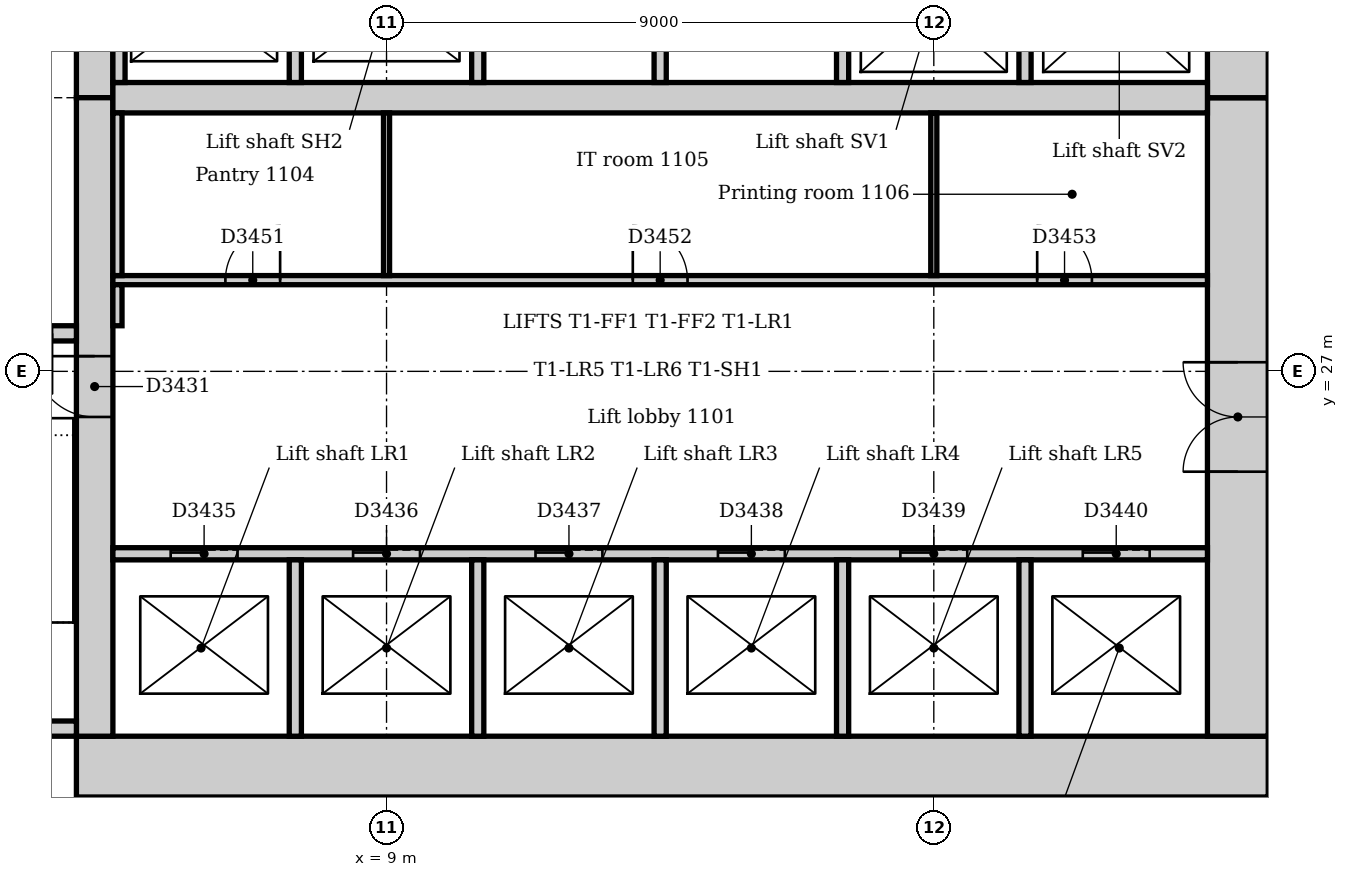
"""IFC4 building model, lengths in metres.
Left out: names, types, materials, properties, quantities, classifications, styles, units other than length and angle.
Written with IfcOpenShell. Run it as: python <this file> out.ifc"""

import sys

from ifc_helpers import new_model, si_unit, direction, frame, frame_2d, origin, place, context, subcontext, project, spatial, rectangle, extrude, element, fill, save


model = new_model("IFC4")
c1 = context("Model", 3, precision=1e-05, world=origin(), true_north=direction((0.0, 1.0)))
c2 = subcontext(c1, "Body", "Model", "MODEL_VIEW")
j1 = project(units=[si_unit("LENGTHUNIT", "METRE"), si_unit("PLANEANGLEUNIT", "RADIAN")], contexts=[c1])
p1 = place(None, origin())
s1 = spatial("IfcSite", under=j1, at=p1, CompositionType="ELEMENT")
p2 = place(p1, origin())
s2 = spatial("IfcBuilding", under=s1, at=p2, CompositionType="ELEMENT")
p3 = place(p2, frame((0.0, 0.0, 51.0)))
s3 = spatial("IfcBuildingStorey", under=s2, at=p3, CompositionType="ELEMENT", Elevation=51.0)
p4 = place(p3, frame((3.9, 20.5, 0.0), z_axis=(0.0, 0.0, 1.0), x_axis=(1.0, 0.0, 0.0)))
e1 = element("IfcWall", 1, at=p4, inside=s3, PredefinedType="SOLIDWALL", context=c2, shape_type="SweptSolid", body=[
    extrude(rectangle(XDim=19.6, YDim=1.0, at=frame_2d((9.8, 0.0))), origin(), (0.0, 0.0, 1.0), 4.0),
])
p5 = place(p3, frame((23.0, 21.0, 0.0), z_axis=(0.0, 0.0, 1.0), x_axis=(0.0, 1.0, 0.0)))
e2 = element("IfcWall", 2, at=p5, inside=s3, PredefinedType="SOLIDWALL", context=c2, shape_type="SweptSolid", body=[
    extrude(rectangle(XDim=10.5, YDim=1.0, at=frame_2d((5.25, 0.0))), origin(), (0.0, 0.0, 1.0), 4.0),
])
p6 = place(p5, frame((4.35, 0.0, 0.0)))
e3 = element("IfcOpeningElement", 3, at=p6, cuts=e2, PredefinedType="OPENING", context=c2, shape_type="SweptSolid", body=[
    extrude(rectangle(XDim=1.8, YDim=2.1, at=frame_2d((0.9, 1.05))), frame((0.0, 0.51, 0.0), z_axis=(0.0, -1.0, 0.0), x_axis=(1.0, 0.0, 0.0)), (0.0, 0.0, 1.0), 1.02),
])
p7 = place(p3, frame((23.0, 31.5, 0.0), z_axis=(0.0, 0.0, 1.0), x_axis=(0.0, 1.0, 0.0)))
e4 = element("IfcWall", 4, at=p7, inside=s3, PredefinedType="SOLIDWALL", context=c2, shape_type="SweptSolid", body=[
    extrude(rectangle(XDim=10.5, YDim=1.0, at=frame_2d((5.25, 0.0))), origin(), (0.0, 0.0, 1.0), 4.0),
])
p8 = place(p7, frame((3.15, 0.0, 0.0)))
e5 = element("IfcOpeningElement", 5, at=p8, cuts=e4, PredefinedType="OPENING", context=c2, shape_type="SweptSolid", body=[
    extrude(rectangle(XDim=1.0, YDim=2.1, at=frame_2d((0.5, 1.05))), frame((0.0, 0.51, 0.0), z_axis=(0.0, -1.0, 0.0), x_axis=(1.0, 0.0, 0.0)), (0.0, 0.0, 1.0), 1.02),
])
p9 = place(p7, frame((5.2, 0.0, 0.0)))
e6 = element("IfcOpeningElement", 6, at=p9, cuts=e4, PredefinedType="OPENING", context=c2, shape_type="SweptSolid", body=[
    extrude(rectangle(XDim=1.0, YDim=2.1, at=frame_2d((0.5, 1.05))), frame((0.0, 0.51, 0.0), z_axis=(0.0, -1.0, 0.0), x_axis=(1.0, 0.0, 0.0)), (0.0, 0.0, 1.0), 1.02),
])
p10 = place(p3, frame((4.2, 42.0, 0.0), z_axis=(0.0, 0.0, 1.0), x_axis=(0.0, -1.0, 0.0)))
e7 = element("IfcWall", 7, at=p10, inside=s3, PredefinedType="SOLIDWALL", context=c2, shape_type="SweptSolid", body=[
    extrude(rectangle(XDim=10.5, YDim=0.6, at=frame_2d((5.25, 0.0))), origin(), (0.0, 0.0, 1.0), 4.0),
])
p11 = place(p10, frame((5.3, 0.0, 0.0)))
e8 = element("IfcOpeningElement", 8, at=p11, cuts=e7, PredefinedType="OPENING", context=c2, shape_type="SweptSolid", body=[
    extrude(rectangle(XDim=1.0, YDim=2.1, at=frame_2d((0.5, 1.05))), frame((0.0, 0.31, 0.0), z_axis=(0.0, -1.0, 0.0), x_axis=(1.0, 0.0, 0.0)), (0.0, 0.0, 1.0), 0.62),
])
p12 = place(p3, frame((4.2, 31.5, 0.0), z_axis=(0.0, 0.0, 1.0), x_axis=(0.0, -1.0, 0.0)))
e9 = element("IfcWall", 9, at=p12, inside=s3, PredefinedType="SOLIDWALL", context=c2, shape_type="SweptSolid", body=[
    extrude(rectangle(XDim=10.5, YDim=0.6, at=frame_2d((5.25, 0.0))), origin(), (0.0, 0.0, 1.0), 4.0),
])
p13 = place(p12, frame((4.25, 0.0, 0.0)))
e10 = element("IfcOpeningElement", 10, at=p13, cuts=e9, PredefinedType="OPENING", context=c2, shape_type="SweptSolid", body=[
    extrude(rectangle(XDim=1.0, YDim=2.1, at=frame_2d((0.5, 1.05))), frame((0.0, 0.31, 0.0), z_axis=(0.0, -1.0, 0.0), x_axis=(1.0, 0.0, 0.0)), (0.0, 0.0, 1.0), 0.62),
])
p14 = place(p3, frame((4.5, 31.5, 0.0), z_axis=(0.0, 0.0, 1.0), x_axis=(1.0, 0.0, 0.0)))
e11 = element("IfcWall", 11, at=p14, inside=s3, PredefinedType="SOLIDWALL", context=c2, shape_type="SweptSolid", body=[
    extrude(rectangle(XDim=18.0, YDim=0.5, at=frame_2d((9.0, 0.0))), origin(), (0.0, 0.0, 1.0), 4.0),
])
p15 = place(p3, frame((0.36, 21.125, 0.0), z_axis=(0.0, 0.0, 1.0), x_axis=(1.0, 0.0, 0.0)))
e12 = element("IfcWall", 12, at=p15, inside=s3, PredefinedType="SOLIDWALL", context=c2, shape_type="SweptSolid", body=[
    extrude(rectangle(XDim=3.54, YDim=0.25, at=frame_2d((1.77, 0.0))), origin(), (0.0, 0.0, 1.0), 4.0),
])
p16 = place(p3, frame((3.9, 27.625, 0.0), z_axis=(0.0, 0.0, 1.0), x_axis=(-1.0, 0.0, 0.0)))
e13 = element("IfcWall", 13, at=p16, inside=s3, PredefinedType="SOLIDWALL", context=c2, shape_type="SweptSolid", body=[
    extrude(rectangle(XDim=3.54, YDim=0.25, at=frame_2d((1.77, 0.0))), origin(), (0.0, 0.0, 1.0), 4.0),
])
p17 = place(p16, frame((0.4, 0.0, 0.0)))
e14 = element("IfcOpeningElement", 14, at=p17, cuts=e13, PredefinedType="OPENING", context=c2, shape_type="SweptSolid", body=[
    extrude(rectangle(XDim=1.0, YDim=2.1, at=frame_2d((0.5, 1.05))), frame((0.0, 0.135, 0.0), z_axis=(0.0, -1.0, 0.0), x_axis=(1.0, 0.0, 0.0)), (0.0, 0.0, 1.0), 0.27),
])
p18 = place(p3, frame((4.5, 24.0, 0.0), z_axis=(0.0, 0.0, 1.0), x_axis=(1.0, 0.0, 0.0)))
e15 = element("IfcWall", 15, at=p18, inside=s3, PredefinedType="PARTITIONING", context=c2, shape_type="SweptSolid", body=[
    extrude(rectangle(XDim=18.0, YDim=0.2, at=frame_2d((9.0, 0.0))), origin(), (0.0, 0.0, 1.0), 3.85),
])
p19 = place(p18, frame((0.95, 0.0, 0.0)))
e16 = element("IfcOpeningElement", 16, at=p19, cuts=e15, PredefinedType="OPENING", context=c2, shape_type="SweptSolid", body=[
    extrude(rectangle(XDim=1.1, YDim=2.1, at=frame_2d((0.55, 1.05))), frame((0.0, 0.11, 0.0), z_axis=(0.0, -1.0, 0.0), x_axis=(1.0, 0.0, 0.0)), (0.0, 0.0, 1.0), 0.22),
])
p20 = place(p18, frame((3.95, 0.0, 0.0)))
e17 = element("IfcOpeningElement", 17, at=p20, cuts=e15, PredefinedType="OPENING", context=c2, shape_type="SweptSolid", body=[
    extrude(rectangle(XDim=1.1, YDim=2.1, at=frame_2d((0.55, 1.05))), frame((0.0, 0.11, 0.0), z_axis=(0.0, -1.0, 0.0), x_axis=(1.0, 0.0, 0.0)), (0.0, 0.0, 1.0), 0.22),
])
p21 = place(p18, frame((6.95, 0.0, 0.0)))
e18 = element("IfcOpeningElement", 18, at=p21, cuts=e15, PredefinedType="OPENING", context=c2, shape_type="SweptSolid", body=[
    extrude(rectangle(XDim=1.1, YDim=2.1, at=frame_2d((0.55, 1.05))), frame((0.0, 0.11, 0.0), z_axis=(0.0, -1.0, 0.0), x_axis=(1.0, 0.0, 0.0)), (0.0, 0.0, 1.0), 0.22),
])
p22 = place(p18, frame((9.95, 0.0, 0.0)))
e19 = element("IfcOpeningElement", 19, at=p22, cuts=e15, PredefinedType="OPENING", context=c2, shape_type="SweptSolid", body=[
    extrude(rectangle(XDim=1.1, YDim=2.1, at=frame_2d((0.55, 1.05))), frame((0.0, 0.11, 0.0), z_axis=(0.0, -1.0, 0.0), x_axis=(1.0, 0.0, 0.0)), (0.0, 0.0, 1.0), 0.22),
])
p23 = place(p18, frame((12.95, 0.0, 0.0)))
e20 = element("IfcOpeningElement", 20, at=p23, cuts=e15, PredefinedType="OPENING", context=c2, shape_type="SweptSolid", body=[
    extrude(rectangle(XDim=1.1, YDim=2.1, at=frame_2d((0.55, 1.05))), frame((0.0, 0.11, 0.0), z_axis=(0.0, -1.0, 0.0), x_axis=(1.0, 0.0, 0.0)), (0.0, 0.0, 1.0), 0.22),
])
p24 = place(p18, frame((15.95, 0.0, 0.0)))
e21 = element("IfcOpeningElement", 21, at=p24, cuts=e15, PredefinedType="OPENING", context=c2, shape_type="SweptSolid", body=[
    extrude(rectangle(XDim=1.1, YDim=2.1, at=frame_2d((0.55, 1.05))), frame((0.0, 0.11, 0.0), z_axis=(0.0, -1.0, 0.0), x_axis=(1.0, 0.0, 0.0)), (0.0, 0.0, 1.0), 0.22),
])
p25 = place(p3, frame((4.6, 31.75, 0.0), z_axis=(0.0, 0.0, 1.0), x_axis=(0.0, 1.0, 0.0)))
e22 = element("IfcWall", 22, at=p25, inside=s3, PredefinedType="PARTITIONING", context=c2, shape_type="SweptSolid", body=[
    extrude(rectangle(XDim=2.65, YDim=0.2, at=frame_2d((1.325, 0.0))), origin(), (0.0, 0.0, 1.0), 3.85),
])
p26 = place(p3, frame((7.5, 21.0, 0.0), z_axis=(0.0, 0.0, 1.0), x_axis=(0.0, 1.0, 0.0)))
e23 = element("IfcWall", 23, at=p26, inside=s3, PredefinedType="PARTITIONING", context=c2, shape_type="SweptSolid", body=[
    extrude(rectangle(XDim=2.9, YDim=0.2, at=frame_2d((1.45, 0.0))), origin(), (0.0, 0.0, 1.0), 3.85),
])
p27 = place(p3, frame((7.5, 31.75, 0.0), z_axis=(0.0, 0.0, 1.0), x_axis=(0.0, 1.0, 0.0)))
e24 = element("IfcWall", 24, at=p27, inside=s3, PredefinedType="PARTITIONING", context=c2, shape_type="SweptSolid", body=[
    extrude(rectangle(XDim=2.65, YDim=0.2, at=frame_2d((1.325, 0.0))), origin(), (0.0, 0.0, 1.0), 3.85),
])
p28 = place(p3, frame((10.5, 21.0, 0.0), z_axis=(0.0, 0.0, 1.0), x_axis=(0.0, 1.0, 0.0)))
e25 = element("IfcWall", 25, at=p28, inside=s3, PredefinedType="PARTITIONING", context=c2, shape_type="SweptSolid", body=[
    extrude(rectangle(XDim=2.9, YDim=0.2, at=frame_2d((1.45, 0.0))), origin(), (0.0, 0.0, 1.0), 3.85),
])
p29 = place(p3, frame((10.5, 31.75, 0.0), z_axis=(0.0, 0.0, 1.0), x_axis=(0.0, 1.0, 0.0)))
e26 = element("IfcWall", 26, at=p29, inside=s3, PredefinedType="PARTITIONING", context=c2, shape_type="SweptSolid", body=[
    extrude(rectangle(XDim=2.65, YDim=0.2, at=frame_2d((1.325, 0.0))), origin(), (0.0, 0.0, 1.0), 3.85),
])
p30 = place(p3, frame((13.5, 21.0, 0.0), z_axis=(0.0, 0.0, 1.0), x_axis=(0.0, 1.0, 0.0)))
e27 = element("IfcWall", 27, at=p30, inside=s3, PredefinedType="PARTITIONING", context=c2, shape_type="SweptSolid", body=[
    extrude(rectangle(XDim=2.9, YDim=0.2, at=frame_2d((1.45, 0.0))), origin(), (0.0, 0.0, 1.0), 3.85),
])
p31 = place(p3, frame((13.5, 31.75, 0.0), z_axis=(0.0, 0.0, 1.0), x_axis=(0.0, 1.0, 0.0)))
e28 = element("IfcWall", 28, at=p31, inside=s3, PredefinedType="PARTITIONING", context=c2, shape_type="SweptSolid", body=[
    extrude(rectangle(XDim=2.65, YDim=0.2, at=frame_2d((1.325, 0.0))), origin(), (0.0, 0.0, 1.0), 3.85),
])
p32 = place(p3, frame((16.5, 21.0, 0.0), z_axis=(0.0, 0.0, 1.0), x_axis=(0.0, 1.0, 0.0)))
e29 = element("IfcWall", 29, at=p32, inside=s3, PredefinedType="PARTITIONING", context=c2, shape_type="SweptSolid", body=[
    extrude(rectangle(XDim=2.9, YDim=0.2, at=frame_2d((1.45, 0.0))), origin(), (0.0, 0.0, 1.0), 3.85),
])
p33 = place(p3, frame((16.5, 31.75, 0.0), z_axis=(0.0, 0.0, 1.0), x_axis=(0.0, 1.0, 0.0)))
e30 = element("IfcWall", 30, at=p33, inside=s3, PredefinedType="PARTITIONING", context=c2, shape_type="SweptSolid", body=[
    extrude(rectangle(XDim=2.65, YDim=0.2, at=frame_2d((1.325, 0.0))), origin(), (0.0, 0.0, 1.0), 3.85),
])
p34 = place(p3, frame((19.5, 21.0, 0.0), z_axis=(0.0, 0.0, 1.0), x_axis=(0.0, 1.0, 0.0)))
e31 = element("IfcWall", 31, at=p34, inside=s3, PredefinedType="PARTITIONING", context=c2, shape_type="SweptSolid", body=[
    extrude(rectangle(XDim=2.9, YDim=0.2, at=frame_2d((1.45, 0.0))), origin(), (0.0, 0.0, 1.0), 3.85),
])
p35 = place(p3, frame((19.5, 31.75, 0.0), z_axis=(0.0, 0.0, 1.0), x_axis=(0.0, 1.0, 0.0)))
e32 = element("IfcWall", 32, at=p35, inside=s3, PredefinedType="PARTITIONING", context=c2, shape_type="SweptSolid", body=[
    extrude(rectangle(XDim=2.65, YDim=0.2, at=frame_2d((1.325, 0.0))), origin(), (0.0, 0.0, 1.0), 3.85),
])
p36 = place(p3, frame((4.5, 28.5, 0.0), z_axis=(0.0, 0.0, 1.0), x_axis=(1.0, 0.0, 0.0)))
e33 = element("IfcWall", 33, at=p36, inside=s3, PredefinedType="PARTITIONING", context=c2, shape_type="SweptSolid", body=[
    extrude(rectangle(XDim=18.0, YDim=0.15, at=frame_2d((9.0, 0.0))), origin(), (0.0, 0.0, 1.0), 3.85),
])
p37 = place(p36, frame((1.85, 0.0, 0.0)))
e34 = element("IfcOpeningElement", 34, at=p37, cuts=e33, PredefinedType="OPENING", context=c2, shape_type="SweptSolid", body=[
    extrude(rectangle(XDim=0.9, YDim=2.1, at=frame_2d((0.45, 1.05))), frame((0.0, 0.085, 0.0), z_axis=(0.0, -1.0, 0.0), x_axis=(1.0, 0.0, 0.0)), (0.0, 0.0, 1.0), 0.17),
])
p38 = place(p36, frame((8.55, 0.0, 0.0)))
e35 = element("IfcOpeningElement", 35, at=p38, cuts=e33, PredefinedType="OPENING", context=c2, shape_type="SweptSolid", body=[
    extrude(rectangle(XDim=0.9, YDim=2.1, at=frame_2d((0.45, 1.05))), frame((0.0, 0.085, 0.0), z_axis=(0.0, -1.0, 0.0), x_axis=(1.0, 0.0, 0.0)), (0.0, 0.0, 1.0), 0.17),
])
p39 = place(p36, frame((15.2, 0.0, 0.0)))
e36 = element("IfcOpeningElement", 36, at=p39, cuts=e33, PredefinedType="OPENING", context=c2, shape_type="SweptSolid", body=[
    extrude(rectangle(XDim=0.9, YDim=2.1, at=frame_2d((0.45, 1.05))), frame((0.0, 0.085, 0.0), z_axis=(0.0, -1.0, 0.0), x_axis=(1.0, 0.0, 0.0)), (0.0, 0.0, 1.0), 0.17),
])
p40 = place(p3, frame((4.575, 27.75, 0.0), z_axis=(0.0, 0.0, 1.0), x_axis=(0.0, 1.0, 0.0)))
e37 = element("IfcWall", 37, at=p40, inside=s3, PredefinedType="PARTITIONING", context=c2, shape_type="SweptSolid", body=[
    extrude(rectangle(XDim=0.675, YDim=0.15, at=frame_2d((0.338, 0.0))), origin(), (0.0, 0.0, 1.0), 3.85),
])
p41 = place(p3, frame((4.575, 28.575, 0.0), z_axis=(0.0, 0.0, 1.0), x_axis=(0.0, 1.0, 0.0)))
e38 = element("IfcWall", 38, at=p41, inside=s3, PredefinedType="PARTITIONING", context=c2, shape_type="SweptSolid", body=[
    extrude(rectangle(XDim=2.675, YDim=0.15, at=frame_2d((1.337, 0.0))), origin(), (0.0, 0.0, 1.0), 3.85),
])
for number, where, z_axis, x_axis in (
    (39, (9.0, 28.575, 0.0), (0.0, 0.0, 1.0), (0.0, 1.0, 0.0)),
    (40, (18.0, 28.575, 0.0), (0.0, 0.0, 1.0), (0.0, 1.0, 0.0)),
):
    element("IfcWall", number, at=place(p3, frame(where, z_axis=z_axis, x_axis=x_axis)), inside=s3, PredefinedType="PARTITIONING", context=c2, shape_type="SweptSolid", body=[
        extrude(rectangle(XDim=2.675, YDim=0.1, at=frame_2d((1.337, 0.0))), origin(), (0.0, 0.0, 1.0), 3.85),
    ])
p42 = place(p13, frame((1.0, 0.0, 0.0), z_axis=(0.0, 0.0, 1.0), x_axis=(-1.0, 0.0, 0.0)))
e41 = element("IfcDoor", 41, at=p42, inside=s3, OperationType="SINGLE_SWING_RIGHT", PredefinedType="DOOR", context=c2, shape_type="SweptSolid", body=[
    extrude(rectangle(XDim=1.0, YDim=2.1, at=frame_2d((0.5, 1.05))), frame((0.0, 0.025, 0.0), z_axis=(0.0, -1.0, 0.0), x_axis=(1.0, 0.0, 0.0)), (0.0, 0.0, 1.0), 0.05),
])
fill(e10, e41)
p43 = place(p19, origin())
e42 = element("IfcDoor", 42, at=p43, inside=s3, OperationType="SLIDING_TO_LEFT", PredefinedType="DOOR", context=c2, shape_type="SweptSolid", body=[
    extrude(rectangle(XDim=1.1, YDim=2.1, at=frame_2d((0.55, 1.05))), frame((0.0, 0.025, 0.0), z_axis=(0.0, -1.0, 0.0), x_axis=(1.0, 0.0, 0.0)), (0.0, 0.0, 1.0), 0.05),
])
fill(e16, e42)
p44 = place(p20, origin())
e43 = element("IfcDoor", 43, at=p44, inside=s3, OperationType="SLIDING_TO_LEFT", PredefinedType="DOOR", context=c2, shape_type="SweptSolid", body=[
    extrude(rectangle(XDim=1.1, YDim=2.1, at=frame_2d((0.55, 1.05))), frame((0.0, 0.025, 0.0), z_axis=(0.0, -1.0, 0.0), x_axis=(1.0, 0.0, 0.0)), (0.0, 0.0, 1.0), 0.05),
])
fill(e17, e43)
p45 = place(p21, origin())
e44 = element("IfcDoor", 44, at=p45, inside=s3, OperationType="SLIDING_TO_LEFT", PredefinedType="DOOR", context=c2, shape_type="SweptSolid", body=[
    extrude(rectangle(XDim=1.1, YDim=2.1, at=frame_2d((0.55, 1.05))), frame((0.0, 0.025, 0.0), z_axis=(0.0, -1.0, 0.0), x_axis=(1.0, 0.0, 0.0)), (0.0, 0.0, 1.0), 0.05),
])
fill(e18, e44)
p46 = place(p22, origin())
e45 = element("IfcDoor", 45, at=p46, inside=s3, OperationType="SLIDING_TO_LEFT", PredefinedType="DOOR", context=c2, shape_type="SweptSolid", body=[
    extrude(rectangle(XDim=1.1, YDim=2.1, at=frame_2d((0.55, 1.05))), frame((0.0, 0.025, 0.0), z_axis=(0.0, -1.0, 0.0), x_axis=(1.0, 0.0, 0.0)), (0.0, 0.0, 1.0), 0.05),
])
fill(e19, e45)
p47 = place(p23, origin())
e46 = element("IfcDoor", 46, at=p47, inside=s3, OperationType="SLIDING_TO_LEFT", PredefinedType="DOOR", context=c2, shape_type="SweptSolid", body=[
    extrude(rectangle(XDim=1.1, YDim=2.1, at=frame_2d((0.55, 1.05))), frame((0.0, 0.025, 0.0), z_axis=(0.0, -1.0, 0.0), x_axis=(1.0, 0.0, 0.0)), (0.0, 0.0, 1.0), 0.05),
])
fill(e20, e46)
p48 = place(p24, origin())
e47 = element("IfcDoor", 47, at=p48, inside=s3, OperationType="SLIDING_TO_LEFT", PredefinedType="DOOR", context=c2, shape_type="SweptSolid", body=[
    extrude(rectangle(XDim=1.1, YDim=2.1, at=frame_2d((0.55, 1.05))), frame((0.0, 0.025, 0.0), z_axis=(0.0, -1.0, 0.0), x_axis=(1.0, 0.0, 0.0)), (0.0, 0.0, 1.0), 0.05),
])
fill(e21, e47)
p49 = place(p6, origin())
e48 = element("IfcDoor", 48, at=p49, inside=s3, OperationType="DOUBLE_DOOR_DOUBLE_SWING", PredefinedType="DOOR", context=c2, shape_type="SweptSolid", body=[
    extrude(rectangle(XDim=1.8, YDim=2.1, at=frame_2d((0.9, 1.05))), frame((0.0, 0.025, 0.0), z_axis=(0.0, -1.0, 0.0), x_axis=(1.0, 0.0, 0.0)), (0.0, 0.0, 1.0), 0.05),
])
fill(e3, e48)
p50 = place(p37, origin())
e49 = element("IfcDoor", 49, at=p50, inside=s3, OperationType="SINGLE_SWING_RIGHT", PredefinedType="DOOR", context=c2, shape_type="SweptSolid", body=[
    extrude(rectangle(XDim=0.9, YDim=2.1, at=frame_2d((0.45, 1.05))), frame((0.0, 0.025, 0.0), z_axis=(0.0, -1.0, 0.0), x_axis=(1.0, 0.0, 0.0)), (0.0, 0.0, 1.0), 0.05),
])
fill(e34, e49)
p51 = place(p38, origin())
e50 = element("IfcDoor", 50, at=p51, inside=s3, OperationType="SINGLE_SWING_LEFT", PredefinedType="DOOR", context=c2, shape_type="SweptSolid", body=[
    extrude(rectangle(XDim=0.9, YDim=2.1, at=frame_2d((0.45, 1.05))), frame((0.0, 0.025, 0.0), z_axis=(0.0, -1.0, 0.0), x_axis=(1.0, 0.0, 0.0)), (0.0, 0.0, 1.0), 0.05),
])
fill(e35, e50)
p52 = place(p39, origin())
e51 = element("IfcDoor", 51, at=p52, inside=s3, OperationType="SINGLE_SWING_LEFT", PredefinedType="DOOR", context=c2, shape_type="SweptSolid", body=[
    extrude(rectangle(XDim=0.9, YDim=2.1, at=frame_2d((0.45, 1.05))), frame((0.0, 0.025, 0.0), z_axis=(0.0, -1.0, 0.0), x_axis=(1.0, 0.0, 0.0)), (0.0, 0.0, 1.0), 0.05),
])
fill(e36, e51)
save(model, sys.argv[1])
